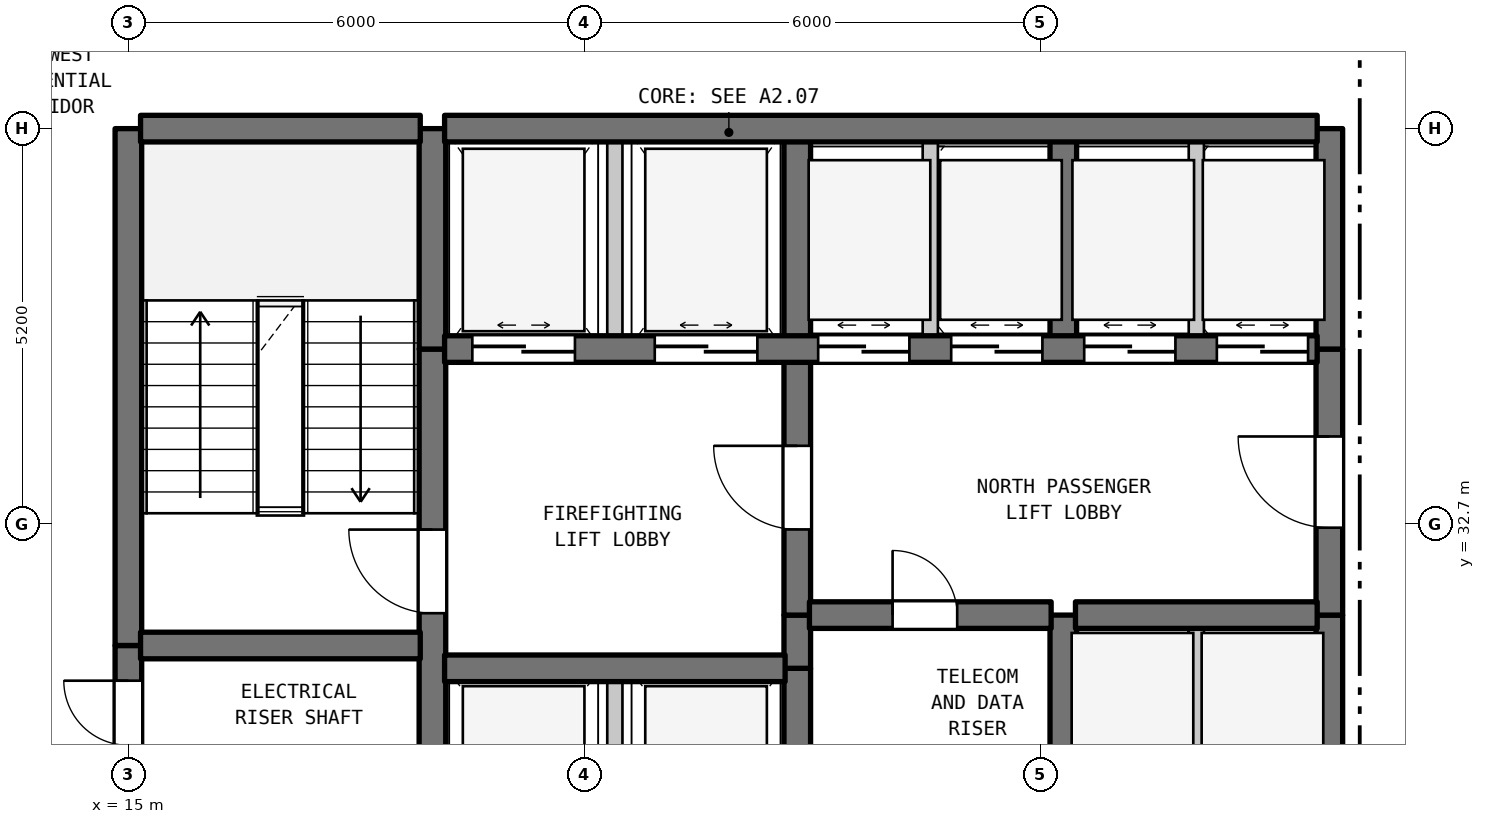
"""IFC4 building model, lengths in metres.
Left out: names, types, materials, properties, quantities, classifications, styles, units other than length and angle.
Written with IfcOpenShell. Run it as: python <this file> out.ifc"""

import sys

from ifc_helpers import new_model, si_unit, direction, frame, frame_2d, origin, place, context, subcontext, project, spatial, rectangle, extrude, element, fill, save


model = new_model("IFC4")
c1 = context("Model", 3, precision=1e-05, world=origin(), true_north=direction((0.0, 1.0)))
c2 = subcontext(c1, "Body", "Model", "MODEL_VIEW")
j1 = project(units=[si_unit("LENGTHUNIT", "METRE"), si_unit("PLANEANGLEUNIT", "RADIAN")], contexts=[c1])
p1 = place(None, origin())
s1 = spatial("IfcSite", under=j1, at=p1, CompositionType="ELEMENT")
p2 = place(p1, origin())
s2 = spatial("IfcBuilding", under=s1, at=p2, CompositionType="ELEMENT")
p3 = place(p2, frame((0.0, 0.0, 38.8)))
s3 = spatial("IfcBuildingStorey", under=s2, at=p3, CompositionType="ELEMENT", Elevation=38.8)
p4 = place(p3, frame((15.0, 29.5, 0.0), z_axis=(0.0, 0.0, 1.0), x_axis=(0.0, 1.0, 0.0)))
e1 = element("IfcWall", 1, at=p4, inside=s3, PredefinedType="SHEAR", context=c2, shape_type="SweptSolid", body=[
    extrude(rectangle(XDim=1.6, YDim=0.35, at=frame_2d((0.8, 0.0))), origin(), (0.0, 0.0, 1.0), 3.385),
])
p5 = place(p4, frame((0.287, 0.0, 0.0)))
e2 = element("IfcOpeningElement", 2, at=p5, cuts=e1, PredefinedType="OPENING", context=c2, shape_type="SweptSolid", body=[
    extrude(rectangle(XDim=0.85, YDim=2.1, at=frame_2d((0.425, 1.05))), frame((0.0, 0.185, 0.0), z_axis=(0.0, -1.0, 0.0), x_axis=(1.0, 0.0, 0.0)), (0.0, 0.0, 1.0), 0.37),
])
p6 = place(p3, frame((15.0, 31.1, 0.0), z_axis=(0.0, 0.0, 1.0), x_axis=(0.0, 1.0, 0.0)))
e3 = element("IfcWall", 3, at=p6, inside=s3, PredefinedType="SHEAR", context=c2, shape_type="SweptSolid", body=[
    extrude(rectangle(XDim=6.8, YDim=0.35, at=frame_2d((3.4, 0.0))), origin(), (0.0, 0.0, 1.0), 3.385),
])
p7 = place(p3, frame((19.0, 29.5, 0.0), z_axis=(0.0, 0.0, 1.0), x_axis=(0.0, 1.0, 0.0)))
e4 = element("IfcWall", 4, at=p7, inside=s3, PredefinedType="SHEAR", context=c2, shape_type="SweptSolid", body=[
    extrude(rectangle(XDim=5.5, YDim=0.35, at=frame_2d((2.75, 0.0))), origin(), (0.0, 0.0, 1.0), 3.385),
])
p8 = place(p7, frame((2.025, 0.0, 0.0)))
e5 = element("IfcOpeningElement", 5, at=p8, cuts=e4, PredefinedType="OPENING", context=c2, shape_type="SweptSolid", body=[
    extrude(rectangle(XDim=1.1, YDim=2.15, at=frame_2d((0.55, 1.075))), frame((0.0, 0.185, 0.0), z_axis=(0.0, -1.0, 0.0), x_axis=(1.0, 0.0, 0.0)), (0.0, 0.0, 1.0), 0.37),
])
p9 = place(p3, frame((19.0, 35.0, 0.0), z_axis=(0.0, 0.0, 1.0), x_axis=(0.0, 1.0, 0.0)))
e6 = element("IfcWall", 6, at=p9, inside=s3, PredefinedType="SHEAR", context=c2, shape_type="SweptSolid", body=[
    extrude(rectangle(XDim=2.9, YDim=0.35, at=frame_2d((1.45, 0.0))), origin(), (0.0, 0.0, 1.0), 3.385),
])
p10 = place(p3, frame((21.4, 28.2, 0.0), z_axis=(0.0, 0.0, 1.0), x_axis=(0.0, 1.0, 0.0)))
e7 = element("IfcWall", 7, at=p10, inside=s3, PredefinedType="STANDARD", context=c2, shape_type="SweptSolid", body=[
    extrude(rectangle(XDim=2.6, YDim=0.2, at=frame_2d((1.3, 0.0))), origin(), (0.0, 0.0, 1.0), 3.385),
])
p11 = place(p3, frame((21.4, 35.0, 0.0), z_axis=(0.0, 0.0, 1.0), x_axis=(0.0, 1.0, 0.0)))
e8 = element("IfcWall", 8, at=p11, inside=s3, PredefinedType="STANDARD", context=c2, shape_type="SweptSolid", body=[
    extrude(rectangle(XDim=2.9, YDim=0.2, at=frame_2d((1.45, 0.0))), origin(), (0.0, 0.0, 1.0), 3.385),
])
p12 = place(p3, frame((23.8, 29.5, 0.0), z_axis=(0.0, 0.0, 1.0), x_axis=(0.0, 1.0, 0.0)))
e9 = element("IfcWall", 9, at=p12, inside=s3, PredefinedType="SHEAR", context=c2, shape_type="SweptSolid", body=[
    extrude(rectangle(XDim=1.3, YDim=0.35, at=frame_2d((0.65, 0.0))), origin(), (0.0, 0.0, 1.0), 3.385),
])
p13 = place(p3, frame((23.8, 30.8, 0.0), z_axis=(0.0, 0.0, 1.0), x_axis=(0.0, 1.0, 0.0)))
e10 = element("IfcWall", 10, at=p13, inside=s3, PredefinedType="SHEAR", context=c2, shape_type="SweptSolid", body=[
    extrude(rectangle(XDim=0.7, YDim=0.35, at=frame_2d((0.35, 0.0))), origin(), (0.0, 0.0, 1.0), 3.385),
])
p14 = place(p3, frame((23.8, 31.5, 0.0), z_axis=(0.0, 0.0, 1.0), x_axis=(0.0, 1.0, 0.0)))
e11 = element("IfcWall", 11, at=p14, inside=s3, PredefinedType="SHEAR", context=c2, shape_type="SweptSolid", body=[
    extrude(rectangle(XDim=3.5, YDim=0.35, at=frame_2d((1.75, 0.0))), origin(), (0.0, 0.0, 1.0), 3.385),
])
p15 = place(p14, frame((1.127, 0.0, 0.0)))
e12 = element("IfcOpeningElement", 12, at=p15, cuts=e11, PredefinedType="OPENING", context=c2, shape_type="SweptSolid", body=[
    extrude(rectangle(XDim=1.1, YDim=2.15, at=frame_2d((0.55, 1.075))), frame((0.0, 0.185, 0.0), z_axis=(0.0, -1.0, 0.0), x_axis=(1.0, 0.0, 0.0)), (0.0, 0.0, 1.0), 0.37),
])
p16 = place(p3, frame((23.8, 35.0, 0.0), z_axis=(0.0, 0.0, 1.0), x_axis=(0.0, 1.0, 0.0)))
e13 = element("IfcWall", 13, at=p16, inside=s3, PredefinedType="SHEAR", context=c2, shape_type="SweptSolid", body=[
    extrude(rectangle(XDim=2.9, YDim=0.35, at=frame_2d((1.45, 0.0))), origin(), (0.0, 0.0, 1.0), 3.385),
])
p17 = place(p3, frame((25.55, 35.0, 0.0), z_axis=(0.0, 0.0, 1.0), x_axis=(0.0, 1.0, 0.0)))
e14 = element("IfcWall", 14, at=p17, inside=s3, PredefinedType="STANDARD", context=c2, shape_type="SweptSolid", body=[
    extrude(rectangle(XDim=2.9, YDim=0.2, at=frame_2d((1.45, 0.0))), origin(), (0.0, 0.0, 1.0), 3.385),
])
p18 = place(p3, frame((27.3, 29.5, 0.0), z_axis=(0.0, 0.0, 1.0), x_axis=(0.0, 1.0, 0.0)))
e15 = element("IfcWall", 15, at=p18, inside=s3, PredefinedType="SHEAR", context=c2, shape_type="SweptSolid", body=[
    extrude(rectangle(XDim=2.0, YDim=0.35, at=frame_2d((1.0, 0.0))), origin(), (0.0, 0.0, 1.0), 3.385),
])
p19 = place(p3, frame((27.3, 35.0, 0.0), z_axis=(0.0, 0.0, 1.0), x_axis=(0.0, 1.0, 0.0)))
e16 = element("IfcWall", 16, at=p19, inside=s3, PredefinedType="SHEAR", context=c2, shape_type="SweptSolid", body=[
    extrude(rectangle(XDim=2.9, YDim=0.35, at=frame_2d((1.45, 0.0))), origin(), (0.0, 0.0, 1.0), 3.385),
])
p20 = place(p3, frame((29.05, 28.9, 0.0), z_axis=(0.0, 0.0, 1.0), x_axis=(0.0, 1.0, 0.0)))
e17 = element("IfcWall", 17, at=p20, inside=s3, PredefinedType="STANDARD", context=c2, shape_type="SweptSolid", body=[
    extrude(rectangle(XDim=2.6, YDim=0.2, at=frame_2d((1.3, 0.0))), origin(), (0.0, 0.0, 1.0), 3.385),
])
p21 = place(p3, frame((29.05, 35.0, 0.0), z_axis=(0.0, 0.0, 1.0), x_axis=(0.0, 1.0, 0.0)))
e18 = element("IfcWall", 18, at=p21, inside=s3, PredefinedType="STANDARD", context=c2, shape_type="SweptSolid", body=[
    extrude(rectangle(XDim=2.9, YDim=0.2, at=frame_2d((1.45, 0.0))), origin(), (0.0, 0.0, 1.0), 3.385),
])
p22 = place(p3, frame((30.8, 28.9, 0.0), z_axis=(0.0, 0.0, 1.0), x_axis=(0.0, 1.0, 0.0)))
e19 = element("IfcWall", 19, at=p22, inside=s3, PredefinedType="SHEAR", context=c2, shape_type="SweptSolid", body=[
    extrude(rectangle(XDim=2.6, YDim=0.35, at=frame_2d((1.3, 0.0))), origin(), (0.0, 0.0, 1.0), 3.385),
])
p23 = place(p3, frame((30.8, 31.5, 0.0), z_axis=(0.0, 0.0, 1.0), x_axis=(0.0, 1.0, 0.0)))
e20 = element("IfcWall", 20, at=p23, inside=s3, PredefinedType="SHEAR", context=c2, shape_type="SweptSolid", body=[
    extrude(rectangle(XDim=3.5, YDim=0.35, at=frame_2d((1.75, 0.0))), origin(), (0.0, 0.0, 1.0), 3.385),
])
p24 = place(p23, frame((1.15, 0.0, 0.0)))
e21 = element("IfcOpeningElement", 21, at=p24, cuts=e20, PredefinedType="OPENING", context=c2, shape_type="SweptSolid", body=[
    extrude(rectangle(XDim=1.2, YDim=2.2, at=frame_2d((0.6, 1.1))), frame((0.0, 0.185, 0.0), z_axis=(0.0, -1.0, 0.0), x_axis=(1.0, 0.0, 0.0)), (0.0, 0.0, 1.0), 0.37),
])
p25 = place(p3, frame((30.8, 35.0, 0.0), z_axis=(0.0, 0.0, 1.0), x_axis=(0.0, 1.0, 0.0)))
e22 = element("IfcWall", 22, at=p25, inside=s3, PredefinedType="SHEAR", context=c2, shape_type="SweptSolid", body=[
    extrude(rectangle(XDim=2.9, YDim=0.35, at=frame_2d((1.45, 0.0))), origin(), (0.0, 0.0, 1.0), 3.385),
])
p26 = place(p3, frame((19.16, 30.8, 0.0), z_axis=(0.0, 0.0, 1.0), x_axis=(1.0, 0.0, 0.0)))
e23 = element("IfcWall", 23, at=p26, inside=s3, PredefinedType="SHEAR", context=c2, shape_type="SweptSolid", body=[
    extrude(rectangle(XDim=4.48, YDim=0.35, at=frame_2d((2.24, 0.0))), origin(), (0.0, 0.0, 1.0), 3.385),
])
p27 = place(p3, frame((15.16, 31.1, 0.0), z_axis=(0.0, 0.0, 1.0), x_axis=(1.0, 0.0, 0.0)))
e24 = element("IfcWall", 24, at=p27, inside=s3, PredefinedType="SHEAR", context=c2, shape_type="SweptSolid", body=[
    extrude(rectangle(XDim=3.68, YDim=0.35, at=frame_2d((1.84, 0.0))), origin(), (0.0, 0.0, 1.0), 3.385),
])
p28 = place(p3, frame((23.96, 31.5, 0.0), z_axis=(0.0, 0.0, 1.0), x_axis=(1.0, 0.0, 0.0)))
e25 = element("IfcWall", 25, at=p28, inside=s3, PredefinedType="SHEAR", context=c2, shape_type="SweptSolid", body=[
    extrude(rectangle(XDim=3.18, YDim=0.35, at=frame_2d((1.59, 0.0))), origin(), (0.0, 0.0, 1.0), 3.385),
])
p29 = place(p28, frame((1.094, 0.0, 0.0)))
e26 = element("IfcOpeningElement", 26, at=p29, cuts=e25, PredefinedType="OPENING", context=c2, shape_type="SweptSolid", body=[
    extrude(rectangle(XDim=0.85, YDim=2.1, at=frame_2d((0.425, 1.05))), frame((0.0, 0.185, 0.0), z_axis=(0.0, -1.0, 0.0), x_axis=(1.0, 0.0, 0.0)), (0.0, 0.0, 1.0), 0.37),
])
p30 = place(p3, frame((27.46, 31.5, 0.0), z_axis=(0.0, 0.0, 1.0), x_axis=(1.0, 0.0, 0.0)))
e27 = element("IfcWall", 27, at=p30, inside=s3, PredefinedType="SHEAR", context=c2, shape_type="SweptSolid", body=[
    extrude(rectangle(XDim=3.18, YDim=0.35, at=frame_2d((1.59, 0.0))), origin(), (0.0, 0.0, 1.0), 3.385),
])
p31 = place(p3, frame((19.16, 35.0, 0.0), z_axis=(0.0, 0.0, 1.0), x_axis=(1.0, 0.0, 0.0)))
e28 = element("IfcWall", 28, at=p31, inside=s3, PredefinedType="SHEAR", context=c2, shape_type="SweptSolid", body=[
    extrude(rectangle(XDim=11.48, YDim=0.35, at=frame_2d((5.74, 0.0))), origin(), (0.0, 0.0, 1.0), 3.385),
])
p32 = place(p31, frame((0.365, 0.0, 0.0)))
e29 = element("IfcOpeningElement", 29, at=p32, cuts=e28, PredefinedType="OPENING", context=c2, shape_type="SweptSolid", body=[
    extrude(rectangle(XDim=1.35, YDim=2.2, at=frame_2d((0.675, 1.1))), frame((0.0, 0.185, 0.0), z_axis=(0.0, -1.0, 0.0), x_axis=(1.0, 0.0, 0.0)), (0.0, 0.0, 1.0), 0.37),
])
p33 = place(p31, frame((2.765, 0.0, 0.0)))
e30 = element("IfcOpeningElement", 30, at=p33, cuts=e28, PredefinedType="OPENING", context=c2, shape_type="SweptSolid", body=[
    extrude(rectangle(XDim=1.35, YDim=2.2, at=frame_2d((0.675, 1.1))), frame((0.0, 0.185, 0.0), z_axis=(0.0, -1.0, 0.0), x_axis=(1.0, 0.0, 0.0)), (0.0, 0.0, 1.0), 0.37),
])
p34 = place(p31, frame((4.915, 0.0, 0.0)))
e31 = element("IfcOpeningElement", 31, at=p34, cuts=e28, PredefinedType="OPENING", context=c2, shape_type="SweptSolid", body=[
    extrude(rectangle(XDim=1.2, YDim=2.2, at=frame_2d((0.6, 1.1))), frame((0.0, 0.185, 0.0), z_axis=(0.0, -1.0, 0.0), x_axis=(1.0, 0.0, 0.0)), (0.0, 0.0, 1.0), 0.37),
])
p35 = place(p31, frame((6.665, 0.0, 0.0)))
e32 = element("IfcOpeningElement", 32, at=p35, cuts=e28, PredefinedType="OPENING", context=c2, shape_type="SweptSolid", body=[
    extrude(rectangle(XDim=1.2, YDim=2.2, at=frame_2d((0.6, 1.1))), frame((0.0, 0.185, 0.0), z_axis=(0.0, -1.0, 0.0), x_axis=(1.0, 0.0, 0.0)), (0.0, 0.0, 1.0), 0.37),
])
p36 = place(p31, frame((8.415, 0.0, 0.0)))
e33 = element("IfcOpeningElement", 33, at=p36, cuts=e28, PredefinedType="OPENING", context=c2, shape_type="SweptSolid", body=[
    extrude(rectangle(XDim=1.2, YDim=2.2, at=frame_2d((0.6, 1.1))), frame((0.0, 0.185, 0.0), z_axis=(0.0, -1.0, 0.0), x_axis=(1.0, 0.0, 0.0)), (0.0, 0.0, 1.0), 0.37),
])
p37 = place(p31, frame((10.16, 0.0, 0.0)))
e34 = element("IfcOpeningElement", 34, at=p37, cuts=e28, PredefinedType="OPENING", context=c2, shape_type="SweptSolid", body=[
    extrude(rectangle(XDim=1.2, YDim=2.2, at=frame_2d((0.6, 1.1))), frame((0.0, 0.185, 0.0), z_axis=(0.0, -1.0, 0.0), x_axis=(1.0, 0.0, 0.0)), (0.0, 0.0, 1.0), 0.37),
])
p38 = place(p3, frame((15.16, 37.9, 0.0), z_axis=(0.0, 0.0, 1.0), x_axis=(1.0, 0.0, 0.0)))
e35 = element("IfcWall", 35, at=p38, inside=s3, PredefinedType="SHEAR", context=c2, shape_type="SweptSolid", body=[
    extrude(rectangle(XDim=3.68, YDim=0.35, at=frame_2d((1.84, 0.0))), origin(), (0.0, 0.0, 1.0), 3.385),
])
p39 = place(p3, frame((19.16, 37.9, 0.0), z_axis=(0.0, 0.0, 1.0), x_axis=(1.0, 0.0, 0.0)))
e36 = element("IfcWall", 36, at=p39, inside=s3, PredefinedType="SHEAR", context=c2, shape_type="SweptSolid", body=[
    extrude(rectangle(XDim=11.48, YDim=0.35, at=frame_2d((5.74, 0.0))), origin(), (0.0, 0.0, 1.0), 3.385),
])
p40 = place(p5, origin())
e37 = element("IfcDoor", 37, at=p40, inside=s3, OperationType="SINGLE_SWING_RIGHT", PredefinedType="DOOR", context=c2, shape_type="SweptSolid", body=[
    extrude(rectangle(XDim=0.85, YDim=2.1, at=frame_2d((0.425, 1.05))), frame((0.0, 0.025, 0.0), z_axis=(0.0, -1.0, 0.0), x_axis=(1.0, 0.0, 0.0)), (0.0, 0.0, 1.0), 0.05),
])
fill(e2, e37)
p41 = place(p8, origin())
e38 = element("IfcDoor", 38, at=p41, inside=s3, OperationType="SINGLE_SWING_RIGHT", PredefinedType="DOOR", context=c2, shape_type="SweptSolid", body=[
    extrude(rectangle(XDim=1.1, YDim=2.15, at=frame_2d((0.55, 1.075))), frame((0.0, 0.025, 0.0), z_axis=(0.0, -1.0, 0.0), x_axis=(1.0, 0.0, 0.0)), (0.0, 0.0, 1.0), 0.05),
])
fill(e5, e38)
p42 = place(p15, origin())
e39 = element("IfcDoor", 39, at=p42, inside=s3, OperationType="SINGLE_SWING_RIGHT", PredefinedType="DOOR", context=c2, shape_type="SweptSolid", body=[
    extrude(rectangle(XDim=1.1, YDim=2.15, at=frame_2d((0.55, 1.075))), frame((0.0, 0.025, 0.0), z_axis=(0.0, -1.0, 0.0), x_axis=(1.0, 0.0, 0.0)), (0.0, 0.0, 1.0), 0.05),
])
fill(e12, e39)
p43 = place(p24, origin())
e40 = element("IfcDoor", 40, at=p43, inside=s3, OperationType="SINGLE_SWING_RIGHT", PredefinedType="DOOR", context=c2, shape_type="SweptSolid", body=[
    extrude(rectangle(XDim=1.2, YDim=2.2, at=frame_2d((0.6, 1.1))), frame((0.0, 0.025, 0.0), z_axis=(0.0, -1.0, 0.0), x_axis=(1.0, 0.0, 0.0)), (0.0, 0.0, 1.0), 0.05),
])
fill(e21, e40)
p44 = place(p29, origin())
e41 = element("IfcDoor", 41, at=p44, inside=s3, OperationType="SINGLE_SWING_LEFT", PredefinedType="DOOR", context=c2, shape_type="SweptSolid", body=[
    extrude(rectangle(XDim=0.85, YDim=2.1, at=frame_2d((0.425, 1.05))), frame((0.0, 0.025, 0.0), z_axis=(0.0, -1.0, 0.0), x_axis=(1.0, 0.0, 0.0)), (0.0, 0.0, 1.0), 0.05),
])
fill(e26, e41)
p45 = place(p32, origin())
e42 = element("IfcDoor", 42, at=p45, inside=s3, OperationType="DOUBLE_DOOR_SLIDING", PredefinedType="DOOR", context=c2, shape_type="SweptSolid", body=[
    extrude(rectangle(XDim=1.35, YDim=2.2, at=frame_2d((0.675, 1.1))), frame((0.0, 0.025, 0.0), z_axis=(0.0, -1.0, 0.0), x_axis=(1.0, 0.0, 0.0)), (0.0, 0.0, 1.0), 0.05),
])
fill(e29, e42)
p46 = place(p33, origin())
e43 = element("IfcDoor", 43, at=p46, inside=s3, OperationType="DOUBLE_DOOR_SLIDING", PredefinedType="DOOR", context=c2, shape_type="SweptSolid", body=[
    extrude(rectangle(XDim=1.35, YDim=2.2, at=frame_2d((0.675, 1.1))), frame((0.0, 0.025, 0.0), z_axis=(0.0, -1.0, 0.0), x_axis=(1.0, 0.0, 0.0)), (0.0, 0.0, 1.0), 0.05),
])
fill(e30, e43)
p47 = place(p34, origin())
e44 = element("IfcDoor", 44, at=p47, inside=s3, OperationType="DOUBLE_DOOR_SLIDING", PredefinedType="DOOR", context=c2, shape_type="SweptSolid", body=[
    extrude(rectangle(XDim=1.2, YDim=2.2, at=frame_2d((0.6, 1.1))), frame((0.0, 0.025, 0.0), z_axis=(0.0, -1.0, 0.0), x_axis=(1.0, 0.0, 0.0)), (0.0, 0.0, 1.0), 0.05),
])
fill(e31, e44)
p48 = place(p35, origin())
e45 = element("IfcDoor", 45, at=p48, inside=s3, OperationType="DOUBLE_DOOR_SLIDING", PredefinedType="DOOR", context=c2, shape_type="SweptSolid", body=[
    extrude(rectangle(XDim=1.2, YDim=2.2, at=frame_2d((0.6, 1.1))), frame((0.0, 0.025, 0.0), z_axis=(0.0, -1.0, 0.0), x_axis=(1.0, 0.0, 0.0)), (0.0, 0.0, 1.0), 0.05),
])
fill(e32, e45)
p49 = place(p36, origin())
e46 = element("IfcDoor", 46, at=p49, inside=s3, OperationType="DOUBLE_DOOR_SLIDING", PredefinedType="DOOR", context=c2, shape_type="SweptSolid", body=[
    extrude(rectangle(XDim=1.2, YDim=2.2, at=frame_2d((0.6, 1.1))), frame((0.0, 0.025, 0.0), z_axis=(0.0, -1.0, 0.0), x_axis=(1.0, 0.0, 0.0)), (0.0, 0.0, 1.0), 0.05),
])
fill(e33, e46)
p50 = place(p37, origin())
e47 = element("IfcDoor", 47, at=p50, inside=s3, OperationType="DOUBLE_DOOR_SLIDING", PredefinedType="DOOR", context=c2, shape_type="SweptSolid", body=[
    extrude(rectangle(XDim=1.2, YDim=2.2, at=frame_2d((0.6, 1.1))), frame((0.0, 0.025, 0.0), z_axis=(0.0, -1.0, 0.0), x_axis=(1.0, 0.0, 0.0)), (0.0, 0.0, 1.0), 0.05),
])
fill(e34, e47)
save(model, sys.argv[1])
